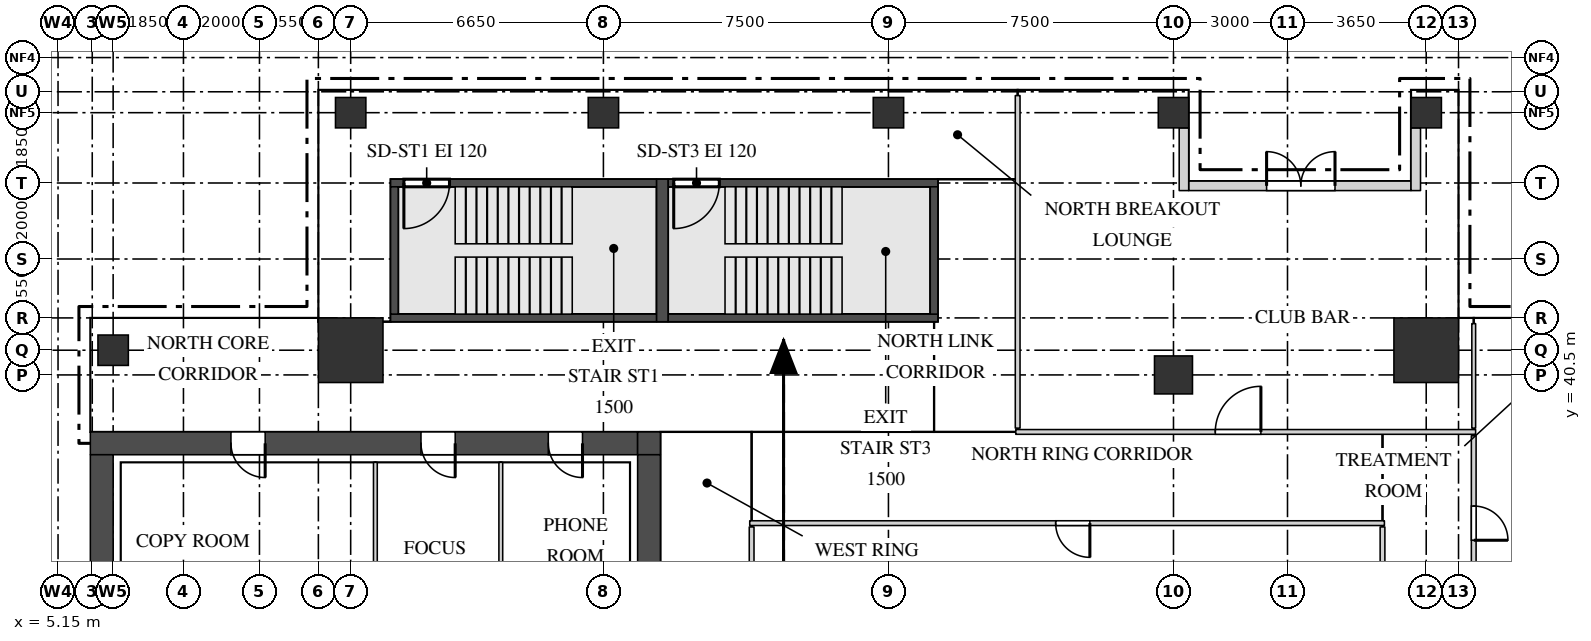
"""IFC4 building model, lengths in metres.
Left out: names, types, materials, properties, quantities, classifications, styles, units other than length and angle.
Written with IfcOpenShell. Run it as: python <this file> out.ifc"""

import sys

from ifc_helpers import new_model, si_unit, direction, frame, frame_2d, origin, origin_2d, place, context, subcontext, project, spatial, rectangle, extrude, source, transform, mapped, element, fill, save


model = new_model("IFC4")
c1 = context("Model", 3, precision=1e-05, world=origin(), true_north=direction((0.0, 1.0)))
c2 = subcontext(c1, "Body", "Model", "MODEL_VIEW")
j1 = project(units=[si_unit("LENGTHUNIT", "METRE"), si_unit("PLANEANGLEUNIT", "RADIAN")], contexts=[c1])
p1 = place(None, origin())
s1 = spatial("IfcSite", under=j1, at=p1, CompositionType="ELEMENT")
p2 = place(p1, origin())
s2 = spatial("IfcBuilding", under=s1, at=p2, CompositionType="ELEMENT")
p3 = place(p2, frame((0.0, 0.0, 298.2)))
s3 = spatial("IfcBuildingStorey", under=s2, at=p3, CompositionType="ELEMENT", Elevation=298.2)
m1 = source(origin(), c2, "Body", "SweptSolid", [
    extrude(rectangle(XDim=14.4, YDim=0.6, at=frame_2d((7.2, 0.0))), origin(), (0.0, 0.0, 1.0), 3.75),
])
p4 = place(p3, frame((6.0, 38.7, 0.0), z_axis=(0.0, 0.0, 1.0), x_axis=(1.0, 0.0, 0.0)))
e1 = element("IfcWall", 1, at=p4, inside=s3, PredefinedType="SHEAR", context=c2, shape_type="MappedRepresentation", body=[
    mapped(m1, transform((0.0, 0.0, 0.0))),
])
m2 = source(origin(), c2, "Body", "SweptSolid", [
    extrude(rectangle(XDim=0.9, YDim=2.1, at=frame_2d((0.45, 1.05))), frame((0.0, 0.31, 0.0), z_axis=(0.0, -1.0, 0.0), x_axis=(1.0, 0.0, 0.0)), (0.0, 0.0, 1.0), 0.62),
])
p5 = place(p4, frame((3.7, 0.0, 0.0)))
e2 = element("IfcOpeningElement", 2, at=p5, cuts=e1, PredefinedType="OPENING", context=c2, shape_type="MappedRepresentation", body=[
    mapped(m2, transform((0.0, 0.0, 0.0))),
])
p6 = place(p4, frame((8.7, 0.0, 0.0)))
e3 = element("IfcOpeningElement", 3, at=p6, cuts=e1, PredefinedType="OPENING", context=c2, shape_type="MappedRepresentation", body=[
    mapped(m2, transform((0.0, 0.0, 0.0))),
])
p7 = place(p4, frame((12.05, 0.0, 0.0)))
e4 = element("IfcOpeningElement", 4, at=p7, cuts=e1, PredefinedType="OPENING", context=c2, shape_type="MappedRepresentation", body=[
    mapped(m2, transform((0.0, 0.0, 0.0))),
])
m3 = source(origin(), c2, "Body", "SweptSolid", [
    extrude(rectangle(XDim=0.6, YDim=0.6, at=frame_2d((0.3, 0.0))), origin(), (0.0, 0.0, 1.0), 3.75),
])
p8 = place(p3, frame((20.4, 38.7, 0.0), z_axis=(0.0, 0.0, 1.0), x_axis=(1.0, 0.0, 0.0)))
e5 = element("IfcWall", 5, at=p8, inside=s3, PredefinedType="SHEAR", context=c2, shape_type="MappedRepresentation", body=[
    mapped(m3, transform((0.0, 0.0, 0.0))),
])
m4 = source(origin(), c2, "Body", "SweptSolid", [
    extrude(rectangle(XDim=22.8, YDim=0.6, at=frame_2d((11.4, 0.0))), origin(), (0.0, 0.0, 1.0), 3.75),
])
p9 = place(p3, frame((20.7, 15.6, 0.0), z_axis=(0.0, 0.0, 1.0), x_axis=(0.0, 1.0, 0.0)))
e6 = element("IfcWall", 6, at=p9, inside=s3, PredefinedType="SHEAR", context=c2, shape_type="MappedRepresentation", body=[
    mapped(m4, transform((0.0, 0.0, 0.0))),
])
m5 = source(origin(), c2, "Body", "SweptSolid", [
    extrude(rectangle(XDim=1.8, YDim=2.1, at=frame_2d((0.9, 1.05))), frame((0.0, 0.31, 0.0), z_axis=(0.0, -1.0, 0.0), x_axis=(1.0, 0.0, 0.0)), (0.0, 0.0, 1.0), 0.62),
])
p10 = place(p9, frame((10.9, 0.0, 0.0)))
e7 = element("IfcOpeningElement", 7, at=p10, cuts=e6, PredefinedType="OPENING", context=c2, shape_type="MappedRepresentation", body=[
    mapped(m5, transform((0.0, 0.0, 0.0))),
])
p11 = place(p9, frame((0.55, 0.0, 0.0)))
e8 = element("IfcOpeningElement", 8, at=p11, cuts=e6, PredefinedType="OPENING", context=c2, shape_type="MappedRepresentation", body=[
    mapped(m2, transform((0.0, 0.0, 0.0))),
])
p12 = place(p9, frame((4.1, 0.0, 0.0)))
e9 = element("IfcOpeningElement", 9, at=p12, cuts=e6, PredefinedType="OPENING", context=c2, shape_type="MappedRepresentation", body=[
    mapped(m2, transform((0.0, 0.0, 0.0))),
])
p13 = place(p3, frame((6.3, 15.6, 0.0), z_axis=(0.0, 0.0, 1.0), x_axis=(0.0, 1.0, 0.0)))
e10 = element("IfcWall", 10, at=p13, inside=s3, PredefinedType="SHEAR", context=c2, shape_type="MappedRepresentation", body=[
    mapped(m4, transform((0.0, 0.0, 0.0))),
])
m6 = source(origin(), c2, "Body", "SweptSolid", [
    extrude(rectangle(XDim=7.0, YDim=0.2, at=frame_2d((3.5, 0.0))), origin(), (0.0, 0.0, 1.0), 3.75),
])
p14 = place(p3, frame((13.9, 45.55, 0.0), z_axis=(0.0, 0.0, 1.0), x_axis=(1.0, 0.0, 0.0)))
e11 = element("IfcWall", 11, at=p14, inside=s3, PredefinedType="SHEAR", context=c2, shape_type="MappedRepresentation", body=[
    mapped(m6, transform((0.0, 0.0, 0.0))),
])
m7 = source(origin(), c2, "Body", "SweptSolid", [
    extrude(rectangle(XDim=1.2, YDim=2.1, at=frame_2d((0.6, 1.05))), frame((0.0, 0.11, 0.0), z_axis=(0.0, -1.0, 0.0), x_axis=(1.0, 0.0, 0.0)), (0.0, 0.0, 1.0), 0.22),
])
p15 = place(p14, frame((0.35, 0.0, 0.0)))
e12 = element("IfcOpeningElement", 12, at=p15, cuts=e11, PredefinedType="OPENING", context=c2, shape_type="MappedRepresentation", body=[
    mapped(m7, transform((0.0, 0.0, 0.0))),
])
p16 = place(p3, frame((13.9, 42.0, 0.0), z_axis=(0.0, 0.0, 1.0), x_axis=(1.0, 0.0, 0.0)))
e13 = element("IfcWall", 13, at=p16, inside=s3, PredefinedType="SHEAR", context=c2, shape_type="MappedRepresentation", body=[
    mapped(m6, transform((0.0, 0.0, 0.0))),
])
m8 = source(origin(), c2, "Body", "SweptSolid", [
    extrude(rectangle(XDim=7.1, YDim=0.2, at=frame_2d((3.55, 0.0))), origin(), (0.0, 0.0, 1.0), 3.75),
])
p17 = place(p3, frame((21.2, 45.55, 0.0), z_axis=(0.0, 0.0, 1.0), x_axis=(1.0, 0.0, 0.0)))
e14 = element("IfcWall", 14, at=p17, inside=s3, PredefinedType="SHEAR", context=c2, shape_type="MappedRepresentation", body=[
    mapped(m8, transform((0.0, 0.0, 0.0))),
])
p18 = place(p17, frame((0.15, 0.0, 0.0)))
e15 = element("IfcOpeningElement", 15, at=p18, cuts=e14, PredefinedType="OPENING", context=c2, shape_type="MappedRepresentation", body=[
    mapped(m7, transform((0.0, 0.0, 0.0))),
])
p19 = place(p3, frame((21.2, 42.0, 0.0), z_axis=(0.0, 0.0, 1.0), x_axis=(1.0, 0.0, 0.0)))
e16 = element("IfcWall", 16, at=p19, inside=s3, PredefinedType="SHEAR", context=c2, shape_type="MappedRepresentation", body=[
    mapped(m8, transform((0.0, 0.0, 0.0))),
])
m9 = source(origin(), c2, "Body", "SweptSolid", [
    extrude(rectangle(XDim=3.75, YDim=0.3, at=frame_2d((1.875, 0.0))), origin(), (0.0, 0.0, 1.0), 3.75),
])
p20 = place(p3, frame((21.05, 41.9, 0.0), z_axis=(0.0, 0.0, 1.0), x_axis=(0.0, 1.0, 0.0)))
e17 = element("IfcWall", 17, at=p20, inside=s3, PredefinedType="SHEAR", context=c2, shape_type="MappedRepresentation", body=[
    mapped(m9, transform((0.0, 0.0, 0.0))),
])
m10 = source(origin(), c2, "Body", "SweptSolid", [
    extrude(rectangle(XDim=3.35, YDim=0.2, at=frame_2d((1.675, 0.0))), origin(), (0.0, 0.0, 1.0), 3.75),
])
for number, where, z_axis, x_axis in (
    (18, (14.0, 42.1, 0.0), (0.0, 0.0, 1.0), (0.0, 1.0, 0.0)),
    (19, (28.2, 42.1, 0.0), (0.0, 0.0, 1.0), (0.0, 1.0, 0.0)),
):
    element("IfcWall", number, at=place(p3, frame(where, z_axis=z_axis, x_axis=x_axis)), inside=s3, PredefinedType="SHEAR", context=c2, shape_type="MappedRepresentation", body=[
        mapped(m10, transform((0.0, 0.0, 0.0))),
    ])
m11 = source(origin(), c2, "Body", "SweptSolid", [
    extrude(rectangle(XDim=1.7, YDim=1.7, at=origin_2d()), origin(), (0.0, 0.0, 1.0), 3.75),
])
for number, where, z_axis, x_axis in (
    (20, (41.15, 41.15, 0.0), (0.0, 0.0, 1.0), (1.0, 0.0, 0.0)),
    (21, (12.85, 41.15, 0.0), (0.0, 0.0, 1.0), (1.0, 0.0, 0.0)),
):
    element("IfcColumn", number, at=place(p3, frame(where, z_axis=z_axis, x_axis=x_axis)), inside=s3, PredefinedType="COLUMN", context=c2, shape_type="MappedRepresentation", body=[
        mapped(m11, transform((0.0, 0.0, 0.0))),
    ])
m12 = source(origin(), c2, "Body", "SweptSolid", [
    extrude(rectangle(XDim=0.8, YDim=0.8, at=origin_2d()), origin(), (0.0, 0.0, 1.0), 3.75),
])
for number, where, z_axis, x_axis in (
    (22, (12.85, 47.4, 0.0), (0.0, 0.0, 1.0), (1.0, 0.0, 0.0)),
    (23, (19.5, 47.4, 0.0), (0.0, 0.0, 1.0), (1.0, 0.0, 0.0)),
    (24, (27.0, 47.4, 0.0), (0.0, 0.0, 1.0), (1.0, 0.0, 0.0)),
    (25, (34.5, 47.4, 0.0), (0.0, 0.0, 1.0), (1.0, 0.0, 0.0)),
    (26, (41.15, 47.4, 0.0), (0.0, 0.0, 1.0), (1.0, 0.0, 0.0)),
    (27, (6.6, 41.15, 0.0), (0.0, 0.0, 1.0), (1.0, 0.0, 0.0)),
):
    element("IfcColumn", number, at=place(p3, frame(where, z_axis=z_axis, x_axis=x_axis)), inside=s3, PredefinedType="COLUMN", context=c2, shape_type="MappedRepresentation", body=[
        mapped(m12, transform((0.0, 0.0, 0.0))),
    ])
m13 = source(origin(), c2, "Body", "SweptSolid", [
    extrude(rectangle(XDim=1.0, YDim=1.0, at=origin_2d()), origin(), (0.0, 0.0, 1.0), 3.75),
])
p21 = place(p3, frame((34.5, 40.5, 0.0), z_axis=(0.0, 0.0, 1.0), x_axis=(1.0, 0.0, 0.0)))
e28 = element("IfcColumn", 28, at=p21, inside=s3, PredefinedType="COLUMN", context=c2, shape_type="MappedRepresentation", body=[
    mapped(m13, transform((0.0, 0.0, 0.0))),
])
m14 = source(origin(), c2, "Body", "SweptSolid", [
    extrude(rectangle(XDim=5.85, YDim=0.25, at=frame_2d((2.925, 0.0))), origin(), (0.0, 0.0, 1.0), 3.75),
])
p22 = place(p3, frame((34.9, 45.475, 0.0), z_axis=(0.0, 0.0, 1.0), x_axis=(1.0, 0.0, 0.0)))
e29 = element("IfcWall", 29, at=p22, inside=s3, PredefinedType="SOLIDWALL", context=c2, shape_type="MappedRepresentation", body=[
    mapped(m14, transform((0.0, 0.0, 0.0))),
])
m15 = source(origin(), c2, "Body", "SweptSolid", [
    extrude(rectangle(XDim=1.4, YDim=2.4, at=frame_2d((0.7, 1.2))), frame((0.0, 0.135, 0.0), z_axis=(0.0, -1.0, 0.0), x_axis=(1.0, 0.0, 0.0)), (0.0, 0.0, 1.0), 0.27),
])
p23 = place(p22, frame((0.35, 0.0, 0.0)))
e30 = element("IfcOpeningElement", 30, at=p23, cuts=e29, PredefinedType="OPENING", context=c2, shape_type="MappedRepresentation", body=[
    mapped(m15, transform((0.0, 0.0, 0.0))),
])
p24 = place(p22, frame((4.15, 0.0, 0.0)))
e31 = element("IfcOpeningElement", 31, at=p24, cuts=e29, PredefinedType="OPENING", context=c2, shape_type="MappedRepresentation", body=[
    mapped(m15, transform((0.0, 0.0, 0.0))),
])
m16 = source(origin(), c2, "Body", "SweptSolid", [
    extrude(rectangle(XDim=1.8, YDim=2.4, at=frame_2d((0.9, 1.2))), frame((0.0, 0.135, 0.0), z_axis=(0.0, -1.0, 0.0), x_axis=(1.0, 0.0, 0.0)), (0.0, 0.0, 1.0), 0.27),
])
p25 = place(p22, frame((2.05, 0.0, 0.0)))
e32 = element("IfcOpeningElement", 32, at=p25, cuts=e29, PredefinedType="OPENING", context=c2, shape_type="MappedRepresentation", body=[
    mapped(m16, transform((0.0, 0.0, 0.0))),
])
m17 = source(origin(), c2, "Body", "SweptSolid", [
    extrude(rectangle(XDim=1.65, YDim=0.25, at=frame_2d((0.825, 0.0))), origin(), (0.0, 0.0, 1.0), 3.45),
])
for number, where, z_axis, x_axis in (
    (33, (34.775, 47.0, 0.0), (0.0, 0.0, 1.0), (0.0, -1.0, 0.0)),
    (34, (40.875, 47.0, 0.0), (0.0, 0.0, 1.0), (0.0, -1.0, 0.0)),
):
    element("IfcWall", number, at=place(p3, frame(where, z_axis=z_axis, x_axis=x_axis)), inside=s3, PredefinedType="SOLIDWALL", context=c2, shape_type="MappedRepresentation", body=[
        mapped(m17, transform((0.0, 0.0, 0.0))),
    ])
m18 = source(origin(), c2, "Body", "SweptSolid", [
    extrude(rectangle(XDim=23.8, YDim=0.125, at=frame_2d((11.9, 0.0))), origin(), (0.0, 0.0, 1.0), 3.8),
])
p26 = place(p3, frame((42.4, 15.1, 0.0), z_axis=(0.0, 0.0, 1.0), x_axis=(0.0, 1.0, 0.0)))
e35 = element("IfcWall", 35, at=p26, inside=s3, PredefinedType="PARTITIONING", context=c2, shape_type="MappedRepresentation", body=[
    mapped(m18, transform((0.0, 0.0, 0.0))),
])
m19 = source(origin(), c2, "Body", "SweptSolid", [
    extrude(rectangle(XDim=0.9, YDim=2.1, at=frame_2d((0.45, 1.05))), frame((0.0, 0.073, 0.0), z_axis=(0.0, -1.0, 0.0), x_axis=(1.0, 0.0, 0.0)), (0.0, 0.0, 1.0), 0.145),
])
p27 = place(p26, frame((1.55, 0.0, 0.0)))
e36 = element("IfcOpeningElement", 36, at=p27, cuts=e35, PredefinedType="OPENING", context=c2, shape_type="MappedRepresentation", body=[
    mapped(m19, transform((0.0, 0.0, 0.0))),
])
p28 = place(p26, frame((5.55, 0.0, 0.0)))
e37 = element("IfcOpeningElement", 37, at=p28, cuts=e35, PredefinedType="OPENING", context=c2, shape_type="MappedRepresentation", body=[
    mapped(m19, transform((0.0, 0.0, 0.0))),
])
p29 = place(p26, frame((9.05, 0.0, 0.0)))
e38 = element("IfcOpeningElement", 38, at=p29, cuts=e35, PredefinedType="OPENING", context=c2, shape_type="MappedRepresentation", body=[
    mapped(m19, transform((0.0, 0.0, 0.0))),
])
m20 = source(origin(), c2, "Body", "SweptSolid", [
    extrude(rectangle(XDim=1.0, YDim=2.1, at=frame_2d((0.5, 1.05))), frame((0.0, 0.073, 0.0), z_axis=(0.0, -1.0, 0.0), x_axis=(1.0, 0.0, 0.0)), (0.0, 0.0, 1.0), 0.145),
])
p30 = place(p26, frame((12.4, 0.0, 0.0)))
e39 = element("IfcOpeningElement", 39, at=p30, cuts=e35, PredefinedType="OPENING", context=c2, shape_type="MappedRepresentation", body=[
    mapped(m20, transform((0.0, 0.0, 0.0))),
])
p31 = place(p26, frame((16.6, 0.0, 0.0)))
e40 = element("IfcOpeningElement", 40, at=p31, cuts=e35, PredefinedType="OPENING", context=c2, shape_type="MappedRepresentation", body=[
    mapped(m19, transform((0.0, 0.0, 0.0))),
])
p32 = place(p26, frame((21.05, 0.0, 0.0)))
e41 = element("IfcOpeningElement", 41, at=p32, cuts=e35, PredefinedType="OPENING", context=c2, shape_type="MappedRepresentation", body=[
    mapped(m19, transform((0.0, 0.0, 0.0))),
])
m21 = source(origin(), c2, "Body", "SweptSolid", [
    extrude(rectangle(XDim=19.0, YDim=0.125, at=frame_2d((9.5, 0.0))), origin(), (0.0, 0.0, 1.0), 3.8),
])
p33 = place(p3, frame((23.4, 17.5, 0.0), z_axis=(0.0, 0.0, 1.0), x_axis=(0.0, 1.0, 0.0)))
e42 = element("IfcWall", 42, at=p33, inside=s3, PredefinedType="PARTITIONING", context=c2, shape_type="MappedRepresentation", body=[
    mapped(m21, transform((0.0, 0.0, 0.0))),
])
p34 = place(p33, frame((8.4, 0.0, 0.0)))
e43 = element("IfcOpeningElement", 43, at=p34, cuts=e42, PredefinedType="OPENING", context=c2, shape_type="MappedRepresentation", body=[
    mapped(m19, transform((0.0, 0.0, 0.0))),
])
p35 = place(p3, frame((40.0, 17.5, 0.0), z_axis=(0.0, 0.0, 1.0), x_axis=(0.0, 1.0, 0.0)))
e44 = element("IfcWall", 44, at=p35, inside=s3, PredefinedType="PARTITIONING", context=c2, shape_type="MappedRepresentation", body=[
    mapped(m21, transform((0.0, 0.0, 0.0))),
])
m22 = source(origin(), c2, "Body", "SweptSolid", [
    extrude(rectangle(XDim=6.0, YDim=0.1, at=frame_2d((3.0, 0.0))), origin(), (0.0, 0.0, 1.0), 3.8),
])
p36 = place(p3, frame((13.5, 32.2, 0.0), z_axis=(0.0, 0.0, 1.0), x_axis=(0.0, 1.0, 0.0)))
e45 = element("IfcWall", 45, at=p36, inside=s3, PredefinedType="PARTITIONING", context=c2, shape_type="MappedRepresentation", body=[
    mapped(m22, transform((0.0, 0.0, 0.0))),
])
m23 = source(origin(), c2, "Body", "SweptSolid", [
    extrude(rectangle(XDim=5.9, YDim=0.1, at=frame_2d((2.95, 0.0))), origin(), (0.0, 0.0, 1.0), 3.8),
])
p37 = place(p3, frame((16.8, 32.3, 0.0), z_axis=(0.0, 0.0, 1.0), x_axis=(0.0, 1.0, 0.0)))
e46 = element("IfcWall", 46, at=p37, inside=s3, PredefinedType="PARTITIONING", context=c2, shape_type="MappedRepresentation", body=[
    mapped(m23, transform((0.0, 0.0, 0.0))),
])
m24 = source(origin(), c2, "Body", "SweptSolid", [
    extrude(rectangle(XDim=16.7, YDim=0.125, at=frame_2d((8.35, 0.0))), origin(), (0.0, 0.0, 1.0), 3.8),
])
p38 = place(p3, frame((23.35, 36.6, 0.0), z_axis=(0.0, 0.0, 1.0), x_axis=(1.0, 0.0, 0.0)))
e47 = element("IfcWall", 47, at=p38, inside=s3, PredefinedType="PARTITIONING", context=c2, shape_type="MappedRepresentation", body=[
    mapped(m24, transform((0.0, 0.0, 0.0))),
])
p39 = place(p38, frame((8.05, 0.0, 0.0)))
e48 = element("IfcOpeningElement", 48, at=p39, cuts=e47, PredefinedType="OPENING", context=c2, shape_type="MappedRepresentation", body=[
    mapped(m19, transform((0.0, 0.0, 0.0))),
])
m25 = source(origin(), c2, "Body", "SweptSolid", [
    extrude(rectangle(XDim=12.1, YDim=0.125, at=frame_2d((6.05, 0.0))), origin(), (0.0, 0.0, 1.0), 3.8),
])
p40 = place(p3, frame((30.35, 39.0, 0.0), z_axis=(0.0, 0.0, 1.0), x_axis=(1.0, 0.0, 0.0)))
e49 = element("IfcWall", 49, at=p40, inside=s3, PredefinedType="PARTITIONING", context=c2, shape_type="MappedRepresentation", body=[
    mapped(m25, transform((0.0, 0.0, 0.0))),
])
m26 = source(origin(), c2, "Body", "SweptSolid", [
    extrude(rectangle(XDim=1.2, YDim=2.1, at=frame_2d((0.6, 1.05))), frame((0.0, 0.073, 0.0), z_axis=(0.0, -1.0, 0.0), x_axis=(1.0, 0.0, 0.0)), (0.0, 0.0, 1.0), 0.145),
])
p41 = place(p40, frame((5.25, 0.0, 0.0)))
e50 = element("IfcOpeningElement", 50, at=p41, cuts=e49, PredefinedType="OPENING", context=c2, shape_type="MappedRepresentation", body=[
    mapped(m26, transform((0.0, 0.0, 0.0))),
])
m27 = source(origin(), c2, "Body", "SweptSolid", [
    extrude(rectangle(XDim=8.75, YDim=0.125, at=frame_2d((4.375, 0.0))), origin(), (0.0, 0.0, 1.0), 3.8),
])
p42 = place(p3, frame((30.4, 39.1, 0.0), z_axis=(0.0, 0.0, 1.0), x_axis=(0.0, 1.0, 0.0)))
e51 = element("IfcWall", 51, at=p42, inside=s3, PredefinedType="PARTITIONING", context=c2, shape_type="MappedRepresentation", body=[
    mapped(m27, transform((0.0, 0.0, 0.0))),
])
m28 = source(origin(), c2, "Body", "SweptSolid", [
    extrude(rectangle(XDim=2.75, YDim=0.1, at=frame_2d((1.375, 0.0))), origin(), (0.0, 0.0, 1.0), 3.8),
])
p43 = place(p3, frame((42.4, 39.1, 0.0), z_axis=(0.0, 0.0, 1.0), x_axis=(0.0, 1.0, 0.0)))
e52 = element("IfcWall", 52, at=p43, inside=s3, PredefinedType="PARTITIONING", context=c2, shape_type="MappedRepresentation", body=[
    mapped(m28, transform((0.0, 0.0, 0.0))),
])
m29 = source(origin(), c2, "Body", "SweptSolid", [
    extrude(rectangle(XDim=1.4, YDim=2.4, at=frame_2d((0.7, 1.2))), frame((0.0, 0.03, 0.0), z_axis=(0.0, -1.0, 0.0), x_axis=(1.0, 0.0, 0.0)), (0.0, 0.0, 1.0), 0.06),
])
p44 = place(p23, origin())
e53 = element("IfcWindow", 53, at=p44, inside=s3, PartitioningType="SINGLE_PANEL", PredefinedType="WINDOW", context=c2, shape_type="MappedRepresentation", body=[
    mapped(m29, transform((0.0, 0.0, 0.0))),
])
fill(e30, e53)
p45 = place(p24, origin())
e54 = element("IfcWindow", 54, at=p45, inside=s3, PartitioningType="SINGLE_PANEL", PredefinedType="WINDOW", context=c2, shape_type="MappedRepresentation", body=[
    mapped(m29, transform((0.0, 0.0, 0.0))),
])
fill(e31, e54)
m30 = source(origin(), c2, "Body", "SweptSolid", [
    extrude(rectangle(XDim=1.8, YDim=2.4, at=frame_2d((0.9, 1.2))), frame((0.0, 0.025, 0.0), z_axis=(0.0, -1.0, 0.0), x_axis=(1.0, 0.0, 0.0)), (0.0, 0.0, 1.0), 0.05),
])
p46 = place(p25, origin())
e55 = element("IfcDoor", 55, at=p46, inside=s3, OperationType="DOUBLE_DOOR_DOUBLE_SWING", PredefinedType="DOOR", context=c2, shape_type="MappedRepresentation", body=[
    mapped(m30, transform((0.0, 0.0, 0.0))),
])
fill(e32, e55)
m31 = source(origin(), c2, "Body", "SweptSolid", [
    extrude(rectangle(XDim=0.9, YDim=2.1, at=frame_2d((0.45, 1.05))), frame((0.0, 0.25, 0.0), z_axis=(0.0, -1.0, 0.0), x_axis=(1.0, 0.0, 0.0)), (0.0, 0.0, 1.0), 0.5),
])
p47 = place(p5, origin())
e56 = element("IfcDoor", 56, at=p47, inside=s3, OperationType="SINGLE_SWING_RIGHT", PredefinedType="DOOR", context=c2, shape_type="MappedRepresentation", body=[
    mapped(m31, transform((0.0, 0.0, 0.0))),
])
fill(e2, e56)
p48 = place(p6, origin())
e57 = element("IfcDoor", 57, at=p48, inside=s3, OperationType="SINGLE_SWING_RIGHT", PredefinedType="DOOR", context=c2, shape_type="MappedRepresentation", body=[
    mapped(m31, transform((0.0, 0.0, 0.0))),
])
fill(e3, e57)
p49 = place(p7, origin())
e58 = element("IfcDoor", 58, at=p49, inside=s3, OperationType="SINGLE_SWING_RIGHT", PredefinedType="DOOR", context=c2, shape_type="MappedRepresentation", body=[
    mapped(m31, transform((0.0, 0.0, 0.0))),
])
fill(e4, e58)
m32 = source(origin(), c2, "Body", "SweptSolid", [
    extrude(rectangle(XDim=0.9, YDim=2.1, at=frame_2d((0.45, 1.05))), frame((0.0, 0.025, 0.0), z_axis=(0.0, -1.0, 0.0), x_axis=(1.0, 0.0, 0.0)), (0.0, 0.0, 1.0), 0.05),
])
p50 = place(p32, origin())
e59 = element("IfcDoor", 59, at=p50, inside=s3, OperationType="SINGLE_SWING_LEFT", PredefinedType="DOOR", context=c2, shape_type="MappedRepresentation", body=[
    mapped(m32, transform((0.0, 0.0, 0.0))),
])
fill(e41, e59)
m33 = source(origin(), c2, "Body", "SweptSolid", [
    extrude(rectangle(XDim=1.2, YDim=2.1, at=frame_2d((0.6, 1.05))), frame((0.0, 0.025, 0.0), z_axis=(0.0, -1.0, 0.0), x_axis=(1.0, 0.0, 0.0)), (0.0, 0.0, 1.0), 0.05),
])
p51 = place(p41, origin())
e60 = element("IfcDoor", 60, at=p51, inside=s3, OperationType="SINGLE_SWING_LEFT", PredefinedType="DOOR", context=c2, shape_type="MappedRepresentation", body=[
    mapped(m33, transform((0.0, 0.0, 0.0))),
])
fill(e50, e60)
p52 = place(p39, origin())
e61 = element("IfcDoor", 61, at=p52, inside=s3, OperationType="SINGLE_SWING_RIGHT", PredefinedType="DOOR", context=c2, shape_type="MappedRepresentation", body=[
    mapped(m32, transform((0.0, 0.0, 0.0))),
])
fill(e48, e61)
p53 = place(p15, origin())
e62 = element("IfcDoor", 62, at=p53, inside=s3, OperationType="SINGLE_SWING_LEFT", PredefinedType="DOOR", context=c2, shape_type="MappedRepresentation", body=[
    mapped(m33, transform((0.0, 0.0, 0.0))),
])
fill(e12, e62)
p54 = place(p18, origin())
e63 = element("IfcDoor", 63, at=p54, inside=s3, OperationType="SINGLE_SWING_LEFT", PredefinedType="DOOR", context=c2, shape_type="MappedRepresentation", body=[
    mapped(m33, transform((0.0, 0.0, 0.0))),
])
fill(e15, e63)
save(model, sys.argv[1])
